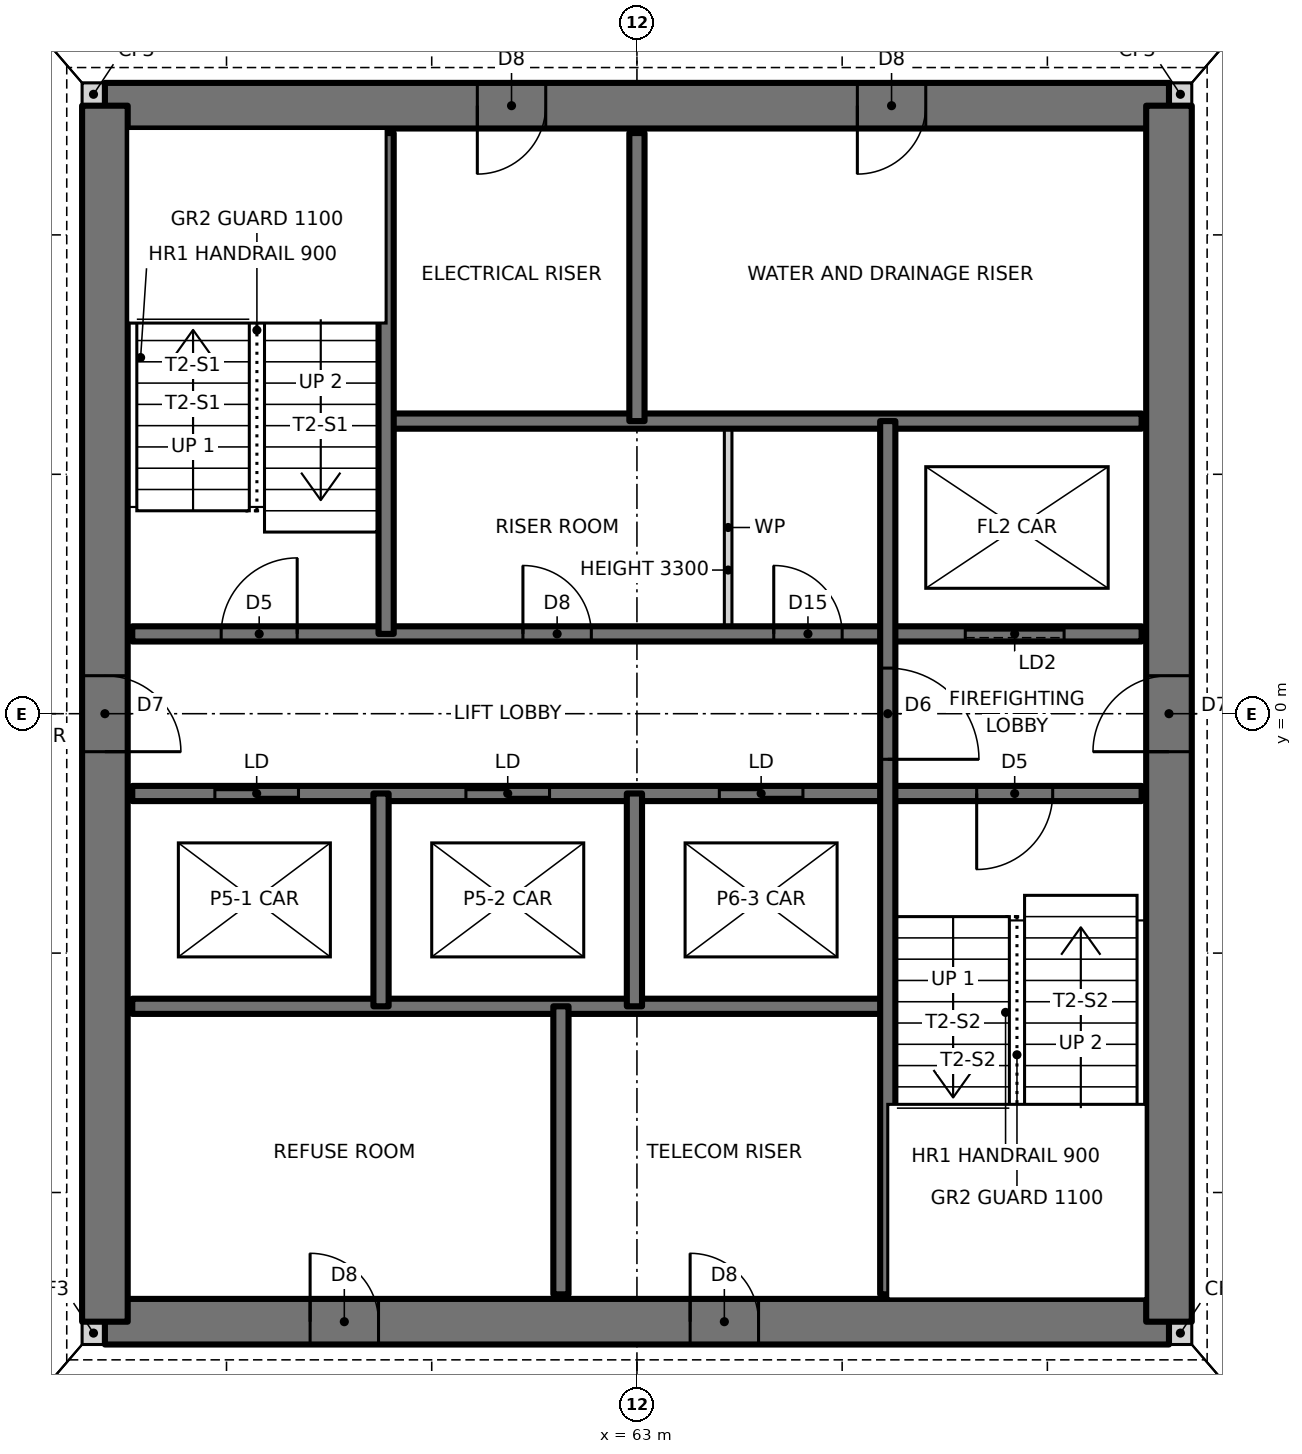
"""IFC4 building model, lengths in metres.
Left out: names, types, materials, properties, quantities, classifications, styles, units other than length and angle.
Written with IfcOpenShell. Run it as: python <this file> out.ifc"""

import sys

from ifc_helpers import new_model, si_unit, direction, frame, frame_2d, origin, place, context, subcontext, project, spatial, rectangle, extrude, element, fill, save


model = new_model("IFC4")
c1 = context("Model", 3, precision=1e-05, world=origin(), true_north=direction((0.0, 1.0)))
c2 = subcontext(c1, "Body", "Model", "MODEL_VIEW")
j1 = project(units=[si_unit("LENGTHUNIT", "METRE"), si_unit("PLANEANGLEUNIT", "RADIAN")], contexts=[c1])
p1 = place(None, origin())
s1 = spatial("IfcSite", under=j1, at=p1, CompositionType="ELEMENT")
p2 = place(p1, origin())
s2 = spatial("IfcBuilding", under=s1, at=p2, CompositionType="ELEMENT")
p3 = place(p2, frame((0.0, 0.0, 36.0)))
s3 = spatial("IfcBuildingStorey", under=s2, at=p3, CompositionType="ELEMENT", Elevation=36.0)
for number, where, z_axis, x_axis in (
    (1, (55.7, -8.15, 0.0), (0.0, 0.0, 1.0), (1.0, 0.0, 0.0)),
    (2, (70.0, -8.15, 0.0), (0.0, 0.0, 1.0), (1.0, 0.0, 0.0)),
    (3, (70.0, 8.15, 0.0), (0.0, 0.0, 1.0), (1.0, 0.0, 0.0)),
    (4, (55.7, 8.15, 0.0), (0.0, 0.0, 1.0), (1.0, 0.0, 0.0)),
):
    element("IfcWall", number, at=place(p3, frame(where, z_axis=z_axis, x_axis=x_axis)), inside=s3, PredefinedType="SOLIDWALL", context=c2, shape_type="SweptSolid", body=[
        extrude(rectangle(XDim=0.3, YDim=0.3, at=frame_2d((0.15, 0.0))), origin(), (0.0, 0.0, 1.0), 3.5),
    ])
p4 = place(p3, frame((56.0, -8.0, 0.0), z_axis=(0.0, 0.0, 1.0), x_axis=(1.0, 0.0, 0.0)))
e5 = element("IfcWall", 5, at=p4, inside=s3, PredefinedType="SHEAR", context=c2, shape_type="SweptSolid", body=[
    extrude(rectangle(XDim=14.0, YDim=0.6, at=frame_2d((7.0, 0.0))), origin(), (0.0, 0.0, 1.0), 3.5),
])
p5 = place(p4, frame((2.7, 0.0, 0.0)))
e6 = element("IfcOpeningElement", 6, at=p5, cuts=e5, PredefinedType="OPENING", context=c2, shape_type="SweptSolid", body=[
    extrude(rectangle(XDim=0.9, YDim=2.1, at=frame_2d((0.45, 1.05))), frame((0.0, 0.31, 0.0), z_axis=(0.0, -1.0, 0.0), x_axis=(1.0, 0.0, 0.0)), (0.0, 0.0, 1.0), 0.62),
])
p6 = place(p4, frame((7.7, 0.0, 0.0)))
e7 = element("IfcOpeningElement", 7, at=p6, cuts=e5, PredefinedType="OPENING", context=c2, shape_type="SweptSolid", body=[
    extrude(rectangle(XDim=0.9, YDim=2.1, at=frame_2d((0.45, 1.05))), frame((0.0, 0.31, 0.0), z_axis=(0.0, -1.0, 0.0), x_axis=(1.0, 0.0, 0.0)), (0.0, 0.0, 1.0), 0.62),
])
p7 = place(p3, frame((70.0, 8.0, 0.0), z_axis=(0.0, 0.0, 1.0), x_axis=(-1.0, 0.0, 0.0)))
e8 = element("IfcWall", 8, at=p7, inside=s3, PredefinedType="SHEAR", context=c2, shape_type="SweptSolid", body=[
    extrude(rectangle(XDim=14.0, YDim=0.6, at=frame_2d((7.0, 0.0))), origin(), (0.0, 0.0, 1.0), 3.5),
])
p8 = place(p7, frame((8.2, 0.0, 0.0)))
e9 = element("IfcOpeningElement", 9, at=p8, cuts=e8, PredefinedType="OPENING", context=c2, shape_type="SweptSolid", body=[
    extrude(rectangle(XDim=0.9, YDim=2.1, at=frame_2d((0.45, 1.05))), frame((0.0, 0.31, 0.0), z_axis=(0.0, -1.0, 0.0), x_axis=(1.0, 0.0, 0.0)), (0.0, 0.0, 1.0), 0.62),
])
p9 = place(p7, frame((3.2, 0.0, 0.0)))
e10 = element("IfcOpeningElement", 10, at=p9, cuts=e8, PredefinedType="OPENING", context=c2, shape_type="SweptSolid", body=[
    extrude(rectangle(XDim=0.9, YDim=2.1, at=frame_2d((0.45, 1.05))), frame((0.0, 0.31, 0.0), z_axis=(0.0, -1.0, 0.0), x_axis=(1.0, 0.0, 0.0)), (0.0, 0.0, 1.0), 0.62),
])
p10 = place(p3, frame((70.0, -8.0, 0.0), z_axis=(0.0, 0.0, 1.0), x_axis=(0.0, 1.0, 0.0)))
e11 = element("IfcWall", 11, at=p10, inside=s3, PredefinedType="SHEAR", context=c2, shape_type="SweptSolid", body=[
    extrude(rectangle(XDim=16.0, YDim=0.6, at=frame_2d((8.0, 0.0))), origin(), (0.0, 0.0, 1.0), 3.5),
])
p11 = place(p10, frame((7.5, 0.0, 0.0)))
e12 = element("IfcOpeningElement", 12, at=p11, cuts=e11, PredefinedType="OPENING", context=c2, shape_type="SweptSolid", body=[
    extrude(rectangle(XDim=1.0, YDim=2.1, at=frame_2d((0.5, 1.05))), frame((0.0, 0.31, 0.0), z_axis=(0.0, -1.0, 0.0), x_axis=(1.0, 0.0, 0.0)), (0.0, 0.0, 1.0), 0.62),
])
p12 = place(p3, frame((56.0, 8.0, 0.0), z_axis=(0.0, 0.0, 1.0), x_axis=(0.0, -1.0, 0.0)))
e13 = element("IfcWall", 13, at=p12, inside=s3, PredefinedType="SHEAR", context=c2, shape_type="SweptSolid", body=[
    extrude(rectangle(XDim=16.0, YDim=0.6, at=frame_2d((8.0, 0.0))), origin(), (0.0, 0.0, 1.0), 3.5),
])
p13 = place(p12, frame((7.5, 0.0, 0.0)))
e14 = element("IfcOpeningElement", 14, at=p13, cuts=e13, PredefinedType="OPENING", context=c2, shape_type="SweptSolid", body=[
    extrude(rectangle(XDim=1.0, YDim=2.1, at=frame_2d((0.5, 1.05))), frame((0.0, 0.31, 0.0), z_axis=(0.0, -1.0, 0.0), x_axis=(1.0, 0.0, 0.0)), (0.0, 0.0, 1.0), 0.62),
])
p14 = place(p3, frame((56.36, -3.85, 0.0), z_axis=(0.0, 0.0, 1.0), x_axis=(1.0, 0.0, 0.0)))
e15 = element("IfcWall", 15, at=p14, inside=s3, PredefinedType="SOLIDWALL", context=c2, shape_type="SweptSolid", body=[
    extrude(rectangle(XDim=9.94, YDim=0.2, at=frame_2d((4.97, 0.0))), origin(), (0.0, 0.0, 1.0), 3.5),
])
p15 = place(p3, frame((56.36, -1.05, 0.0), z_axis=(0.0, 0.0, 1.0), x_axis=(1.0, 0.0, 0.0)))
e16 = element("IfcWall", 16, at=p15, inside=s3, PredefinedType="SOLIDWALL", context=c2, shape_type="SweptSolid", body=[
    extrude(rectangle(XDim=13.28, YDim=0.2, at=frame_2d((6.64, 0.0))), origin(), (0.0, 0.0, 1.0), 3.5),
])
p16 = place(p15, frame((11.11, 0.0, 0.0)))
e17 = element("IfcOpeningElement", 17, at=p16, cuts=e16, PredefinedType="OPENING", context=c2, shape_type="SweptSolid", body=[
    extrude(rectangle(XDim=1.0, YDim=2.1, at=frame_2d((0.5, 1.05))), frame((0.0, 0.11, 0.0), z_axis=(0.0, -1.0, 0.0), x_axis=(1.0, 0.0, 0.0)), (0.0, 0.0, 1.0), 0.22),
])
p17 = place(p15, frame((1.087, 0.0, 0.0)))
e18 = element("IfcOpeningElement", 18, at=p17, cuts=e16, PredefinedType="OPENING", context=c2, shape_type="SweptSolid", body=[
    extrude(rectangle(XDim=1.1, YDim=2.1, at=frame_2d((0.55, 1.05))), frame((0.0, 0.11, 0.0), z_axis=(0.0, -1.0, 0.0), x_axis=(1.0, 0.0, 0.0)), (0.0, 0.0, 1.0), 0.22),
])
p18 = place(p15, frame((4.39, 0.0, 0.0)))
e19 = element("IfcOpeningElement", 19, at=p18, cuts=e16, PredefinedType="OPENING", context=c2, shape_type="SweptSolid", body=[
    extrude(rectangle(XDim=1.1, YDim=2.1, at=frame_2d((0.55, 1.05))), frame((0.0, 0.11, 0.0), z_axis=(0.0, -1.0, 0.0), x_axis=(1.0, 0.0, 0.0)), (0.0, 0.0, 1.0), 0.22),
])
p19 = place(p15, frame((7.724, 0.0, 0.0)))
e20 = element("IfcOpeningElement", 20, at=p19, cuts=e16, PredefinedType="OPENING", context=c2, shape_type="SweptSolid", body=[
    extrude(rectangle(XDim=1.1, YDim=2.1, at=frame_2d((0.55, 1.05))), frame((0.0, 0.11, 0.0), z_axis=(0.0, -1.0, 0.0), x_axis=(1.0, 0.0, 0.0)), (0.0, 0.0, 1.0), 0.22),
])
p20 = place(p3, frame((56.36, 1.05, 0.0), z_axis=(0.0, 0.0, 1.0), x_axis=(1.0, 0.0, 0.0)))
e21 = element("IfcWall", 21, at=p20, inside=s3, PredefinedType="SOLIDWALL", context=c2, shape_type="SweptSolid", body=[
    extrude(rectangle(XDim=13.28, YDim=0.2, at=frame_2d((6.64, 0.0))), origin(), (0.0, 0.0, 1.0), 3.5),
])
p21 = place(p20, frame((1.17, 0.0, 0.0)))
e22 = element("IfcOpeningElement", 22, at=p21, cuts=e21, PredefinedType="OPENING", context=c2, shape_type="SweptSolid", body=[
    extrude(rectangle(XDim=1.0, YDim=2.1, at=frame_2d((0.5, 1.05))), frame((0.0, 0.11, 0.0), z_axis=(0.0, -1.0, 0.0), x_axis=(1.0, 0.0, 0.0)), (0.0, 0.0, 1.0), 0.22),
])
p22 = place(p20, frame((5.14, 0.0, 0.0)))
e23 = element("IfcOpeningElement", 23, at=p22, cuts=e21, PredefinedType="OPENING", context=c2, shape_type="SweptSolid", body=[
    extrude(rectangle(XDim=0.9, YDim=2.1, at=frame_2d((0.45, 1.05))), frame((0.0, 0.11, 0.0), z_axis=(0.0, -1.0, 0.0), x_axis=(1.0, 0.0, 0.0)), (0.0, 0.0, 1.0), 0.22),
])
p23 = place(p20, frame((8.44, 0.0, 0.0)))
e24 = element("IfcOpeningElement", 24, at=p23, cuts=e21, PredefinedType="OPENING", context=c2, shape_type="SweptSolid", body=[
    extrude(rectangle(XDim=0.9, YDim=2.1, at=frame_2d((0.45, 1.05))), frame((0.0, 0.11, 0.0), z_axis=(0.0, -1.0, 0.0), x_axis=(1.0, 0.0, 0.0)), (0.0, 0.0, 1.0), 0.22),
])
p24 = place(p20, frame((10.96, 0.0, 0.0)))
e25 = element("IfcOpeningElement", 25, at=p24, cuts=e21, PredefinedType="OPENING", context=c2, shape_type="SweptSolid", body=[
    extrude(rectangle(XDim=1.3, YDim=2.1, at=frame_2d((0.65, 1.05))), frame((0.0, 0.11, 0.0), z_axis=(0.0, -1.0, 0.0), x_axis=(1.0, 0.0, 0.0)), (0.0, 0.0, 1.0), 0.22),
])
p25 = place(p3, frame((59.7, 3.85, 0.0), z_axis=(0.0, 0.0, 1.0), x_axis=(1.0, 0.0, 0.0)))
e26 = element("IfcWall", 26, at=p25, inside=s3, PredefinedType="SOLIDWALL", context=c2, shape_type="SweptSolid", body=[
    extrude(rectangle(XDim=9.94, YDim=0.2, at=frame_2d((4.97, 0.0))), origin(), (0.0, 0.0, 1.0), 3.5),
])
p26 = place(p3, frame((66.3, -7.64, 0.0), z_axis=(0.0, 0.0, 1.0), x_axis=(0.0, 1.0, 0.0)))
e27 = element("IfcWall", 27, at=p26, inside=s3, PredefinedType="SOLIDWALL", context=c2, shape_type="SweptSolid", body=[
    extrude(rectangle(XDim=11.49, YDim=0.2, at=frame_2d((5.745, 0.0))), origin(), (0.0, 0.0, 1.0), 3.5),
])
p27 = place(p26, frame((7.04, 0.0, 0.0)))
e28 = element("IfcOpeningElement", 28, at=p27, cuts=e27, PredefinedType="OPENING", context=c2, shape_type="SweptSolid", body=[
    extrude(rectangle(XDim=1.2, YDim=2.1, at=frame_2d((0.6, 1.05))), frame((0.0, 0.11, 0.0), z_axis=(0.0, -1.0, 0.0), x_axis=(1.0, 0.0, 0.0)), (0.0, 0.0, 1.0), 0.22),
])
p28 = place(p3, frame((64.2, 1.05, 0.0), z_axis=(0.0, 0.0, 1.0), x_axis=(0.0, 1.0, 0.0)))
e29 = element("IfcWall", 29, at=p28, inside=s3, PredefinedType="PARTITIONING", context=c2, shape_type="SweptSolid", body=[
    extrude(rectangle(XDim=2.8, YDim=0.1, at=frame_2d((1.4, 0.0))), origin(), (0.0, 0.0, 1.0), 3.3),
])
p29 = place(p3, frame((63.0, 3.85, 0.0), z_axis=(0.0, 0.0, 1.0), x_axis=(0.0, 1.0, 0.0)))
e30 = element("IfcWall", 30, at=p29, inside=s3, PredefinedType="SOLIDWALL", context=c2, shape_type="SweptSolid", body=[
    extrude(rectangle(XDim=3.79, YDim=0.2, at=frame_2d((1.895, 0.0))), origin(), (0.0, 0.0, 1.0), 3.5),
])
p30 = place(p3, frame((62.967, -3.85, 0.0), z_axis=(0.0, 0.0, 1.0), x_axis=(0.0, 1.0, 0.0)))
e31 = element("IfcWall", 31, at=p30, inside=s3, PredefinedType="SOLIDWALL", context=c2, shape_type="SweptSolid", body=[
    extrude(rectangle(XDim=2.8, YDim=0.2, at=frame_2d((1.4, 0.0))), origin(), (0.0, 0.0, 1.0), 3.5),
])
p31 = place(p3, frame((62.0, -7.64, 0.0), z_axis=(0.0, 0.0, 1.0), x_axis=(0.0, 1.0, 0.0)))
e32 = element("IfcWall", 32, at=p31, inside=s3, PredefinedType="SOLIDWALL", context=c2, shape_type="SweptSolid", body=[
    extrude(rectangle(XDim=3.79, YDim=0.2, at=frame_2d((1.895, 0.0))), origin(), (0.0, 0.0, 1.0), 3.5),
])
p32 = place(p3, frame((59.7, 1.05, 0.0), z_axis=(0.0, 0.0, 1.0), x_axis=(0.0, 1.0, 0.0)))
e33 = element("IfcWall", 33, at=p32, inside=s3, PredefinedType="SOLIDWALL", context=c2, shape_type="SweptSolid", body=[
    extrude(rectangle(XDim=6.59, YDim=0.2, at=frame_2d((3.295, 0.0))), origin(), (0.0, 0.0, 1.0), 3.5),
])
p33 = place(p3, frame((59.633, -3.85, 0.0), z_axis=(0.0, 0.0, 1.0), x_axis=(0.0, 1.0, 0.0)))
e34 = element("IfcWall", 34, at=p33, inside=s3, PredefinedType="SOLIDWALL", context=c2, shape_type="SweptSolid", body=[
    extrude(rectangle(XDim=2.8, YDim=0.2, at=frame_2d((1.4, 0.0))), origin(), (0.0, 0.0, 1.0), 3.5),
])
p34 = place(p21, origin())
e35 = element("IfcDoor", 35, at=p34, inside=s3, OperationType="SINGLE_SWING_RIGHT", PredefinedType="DOOR", context=c2, shape_type="SweptSolid", body=[
    extrude(rectangle(XDim=1.0, YDim=2.1, at=frame_2d((0.5, 1.05))), frame((0.0, 0.025, 0.0), z_axis=(0.0, -1.0, 0.0), x_axis=(1.0, 0.0, 0.0)), (0.0, 0.0, 1.0), 0.05),
])
fill(e22, e35)
p35 = place(p16, frame((1.0, 0.0, 0.0), z_axis=(0.0, 0.0, 1.0), x_axis=(-1.0, 0.0, 0.0)))
e36 = element("IfcDoor", 36, at=p35, inside=s3, OperationType="SINGLE_SWING_RIGHT", PredefinedType="DOOR", context=c2, shape_type="SweptSolid", body=[
    extrude(rectangle(XDim=1.0, YDim=2.1, at=frame_2d((0.5, 1.05))), frame((0.0, 0.025, 0.0), z_axis=(0.0, -1.0, 0.0), x_axis=(1.0, 0.0, 0.0)), (0.0, 0.0, 1.0), 0.05),
])
fill(e17, e36)
p36 = place(p27, frame((1.2, 0.0, 0.0), z_axis=(0.0, 0.0, 1.0), x_axis=(-1.0, 0.0, 0.0)))
e37 = element("IfcDoor", 37, at=p36, inside=s3, OperationType="SINGLE_SWING_RIGHT", PredefinedType="DOOR", context=c2, shape_type="SweptSolid", body=[
    extrude(rectangle(XDim=1.2, YDim=2.1, at=frame_2d((0.6, 1.05))), frame((0.0, 0.025, 0.0), z_axis=(0.0, -1.0, 0.0), x_axis=(1.0, 0.0, 0.0)), (0.0, 0.0, 1.0), 0.05),
])
fill(e28, e37)
p37 = place(p22, origin())
e38 = element("IfcDoor", 38, at=p37, inside=s3, OperationType="SINGLE_SWING_LEFT", PredefinedType="DOOR", context=c2, shape_type="SweptSolid", body=[
    extrude(rectangle(XDim=0.9, YDim=2.1, at=frame_2d((0.45, 1.05))), frame((0.0, 0.025, 0.0), z_axis=(0.0, -1.0, 0.0), x_axis=(1.0, 0.0, 0.0)), (0.0, 0.0, 1.0), 0.05),
])
fill(e23, e38)
p38 = place(p23, origin())
e39 = element("IfcDoor", 39, at=p38, inside=s3, OperationType="SINGLE_SWING_LEFT", PredefinedType="DOOR", context=c2, shape_type="SweptSolid", body=[
    extrude(rectangle(XDim=0.9, YDim=2.1, at=frame_2d((0.45, 1.05))), frame((0.0, 0.025, 0.0), z_axis=(0.0, -1.0, 0.0), x_axis=(1.0, 0.0, 0.0)), (0.0, 0.0, 1.0), 0.05),
])
fill(e24, e39)
p39 = place(p13, origin())
e40 = element("IfcDoor", 40, at=p39, inside=s3, OperationType="SINGLE_SWING_RIGHT", PredefinedType="DOOR", context=c2, shape_type="SweptSolid", body=[
    extrude(rectangle(XDim=1.0, YDim=2.1, at=frame_2d((0.5, 1.05))), frame((0.0, 0.025, 0.0), z_axis=(0.0, -1.0, 0.0), x_axis=(1.0, 0.0, 0.0)), (0.0, 0.0, 1.0), 0.05),
])
fill(e14, e40)
p40 = place(p11, origin())
e41 = element("IfcDoor", 41, at=p40, inside=s3, OperationType="SINGLE_SWING_LEFT", PredefinedType="DOOR", context=c2, shape_type="SweptSolid", body=[
    extrude(rectangle(XDim=1.0, YDim=2.1, at=frame_2d((0.5, 1.05))), frame((0.0, 0.025, 0.0), z_axis=(0.0, -1.0, 0.0), x_axis=(1.0, 0.0, 0.0)), (0.0, 0.0, 1.0), 0.05),
])
fill(e12, e41)
p41 = place(p8, origin())
e42 = element("IfcDoor", 42, at=p41, inside=s3, OperationType="SINGLE_SWING_RIGHT", PredefinedType="DOOR", context=c2, shape_type="SweptSolid", body=[
    extrude(rectangle(XDim=0.9, YDim=2.1, at=frame_2d((0.45, 1.05))), frame((0.0, 0.025, 0.0), z_axis=(0.0, -1.0, 0.0), x_axis=(1.0, 0.0, 0.0)), (0.0, 0.0, 1.0), 0.05),
])
fill(e9, e42)
p42 = place(p9, origin())
e43 = element("IfcDoor", 43, at=p42, inside=s3, OperationType="SINGLE_SWING_RIGHT", PredefinedType="DOOR", context=c2, shape_type="SweptSolid", body=[
    extrude(rectangle(XDim=0.9, YDim=2.1, at=frame_2d((0.45, 1.05))), frame((0.0, 0.025, 0.0), z_axis=(0.0, -1.0, 0.0), x_axis=(1.0, 0.0, 0.0)), (0.0, 0.0, 1.0), 0.05),
])
fill(e10, e43)
p43 = place(p5, origin())
e44 = element("IfcDoor", 44, at=p43, inside=s3, OperationType="SINGLE_SWING_LEFT", PredefinedType="DOOR", context=c2, shape_type="SweptSolid", body=[
    extrude(rectangle(XDim=0.9, YDim=2.1, at=frame_2d((0.45, 1.05))), frame((0.0, 0.025, 0.0), z_axis=(0.0, -1.0, 0.0), x_axis=(1.0, 0.0, 0.0)), (0.0, 0.0, 1.0), 0.05),
])
fill(e6, e44)
p44 = place(p6, origin())
e45 = element("IfcDoor", 45, at=p44, inside=s3, OperationType="SINGLE_SWING_LEFT", PredefinedType="DOOR", context=c2, shape_type="SweptSolid", body=[
    extrude(rectangle(XDim=0.9, YDim=2.1, at=frame_2d((0.45, 1.05))), frame((0.0, 0.025, 0.0), z_axis=(0.0, -1.0, 0.0), x_axis=(1.0, 0.0, 0.0)), (0.0, 0.0, 1.0), 0.05),
])
fill(e7, e45)
p45 = place(p17, origin())
e46 = element("IfcDoor", 46, at=p45, inside=s3, OperationType="DOUBLE_DOOR_SLIDING", PredefinedType="DOOR", context=c2, shape_type="SweptSolid", body=[
    extrude(rectangle(XDim=1.1, YDim=2.1, at=frame_2d((0.55, 1.05))), frame((0.0, 0.025, 0.0), z_axis=(0.0, -1.0, 0.0), x_axis=(1.0, 0.0, 0.0)), (0.0, 0.0, 1.0), 0.05),
])
fill(e18, e46)
p46 = place(p18, origin())
e47 = element("IfcDoor", 47, at=p46, inside=s3, OperationType="DOUBLE_DOOR_SLIDING", PredefinedType="DOOR", context=c2, shape_type="SweptSolid", body=[
    extrude(rectangle(XDim=1.1, YDim=2.1, at=frame_2d((0.55, 1.05))), frame((0.0, 0.025, 0.0), z_axis=(0.0, -1.0, 0.0), x_axis=(1.0, 0.0, 0.0)), (0.0, 0.0, 1.0), 0.05),
])
fill(e19, e47)
p47 = place(p19, origin())
e48 = element("IfcDoor", 48, at=p47, inside=s3, OperationType="DOUBLE_DOOR_SLIDING", PredefinedType="DOOR", context=c2, shape_type="SweptSolid", body=[
    extrude(rectangle(XDim=1.1, YDim=2.1, at=frame_2d((0.55, 1.05))), frame((0.0, 0.025, 0.0), z_axis=(0.0, -1.0, 0.0), x_axis=(1.0, 0.0, 0.0)), (0.0, 0.0, 1.0), 0.05),
])
fill(e20, e48)
p48 = place(p24, origin())
e49 = element("IfcDoor", 49, at=p48, inside=s3, OperationType="SLIDING_TO_LEFT", PredefinedType="DOOR", context=c2, shape_type="SweptSolid", body=[
    extrude(rectangle(XDim=1.3, YDim=2.1, at=frame_2d((0.65, 1.05))), frame((0.0, 0.025, 0.0), z_axis=(0.0, -1.0, 0.0), x_axis=(1.0, 0.0, 0.0)), (0.0, 0.0, 1.0), 0.05),
])
fill(e25, e49)
save(model, sys.argv[1])
